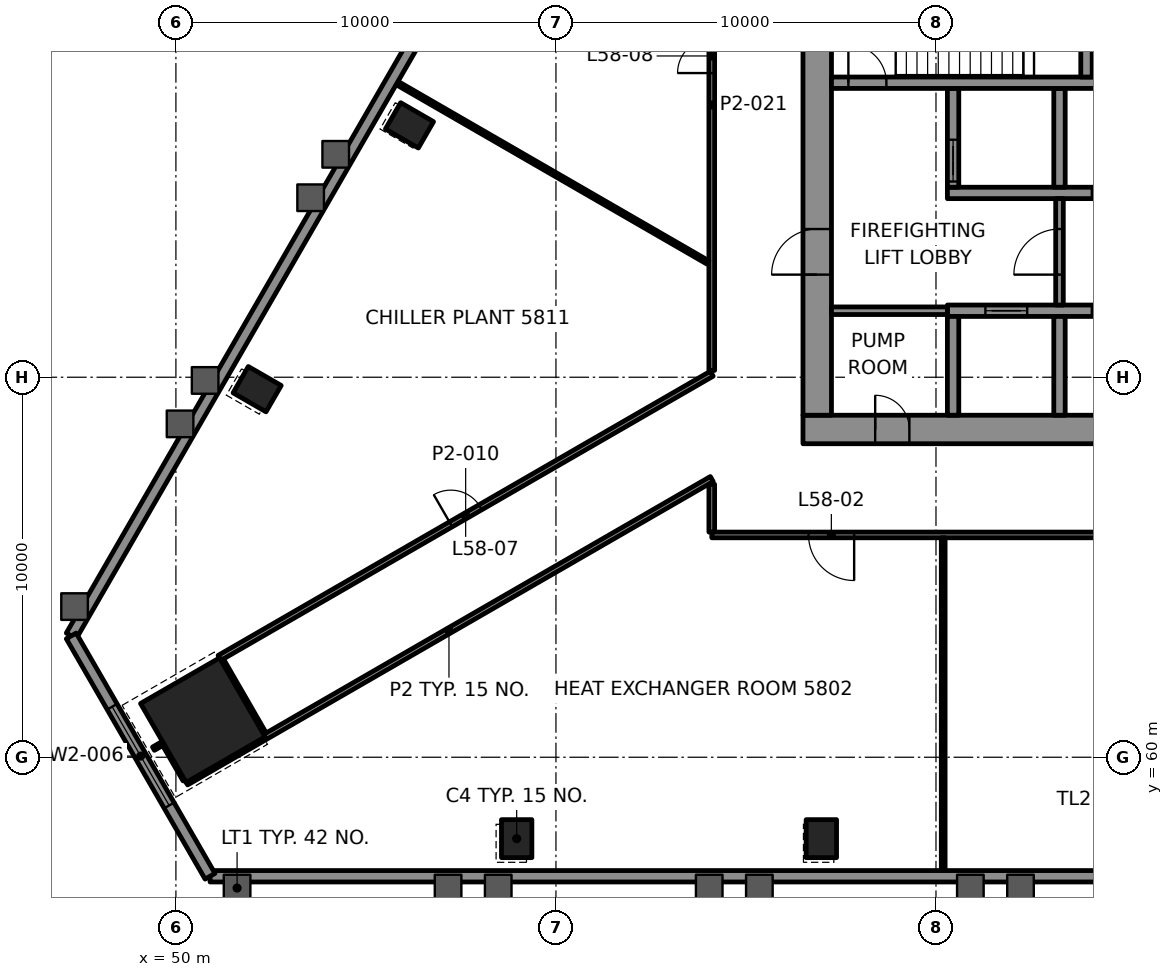
"""IFC4 building model, lengths in metres.
Left out: names, types, materials, properties, quantities, classifications, styles, units other than length and angle.
Written with IfcOpenShell. Run it as: python <this file> out.ifc"""

import sys

from ifc_helpers import new_model, si_unit, direction, frame, frame_2d, origin, origin_2d, place, context, subcontext, project, spatial, rectangle, hollow_rectangle, extrude, element, fill, save


model = new_model("IFC4")
c1 = context("Model", 3, precision=1e-05, world=origin(), true_north=direction((0.0, 1.0)))
c2 = subcontext(c1, "Body", "Model", "MODEL_VIEW")
j1 = project(units=[si_unit("LENGTHUNIT", "METRE"), si_unit("PLANEANGLEUNIT", "RADIAN")], contexts=[c1])
p1 = place(None, origin())
s1 = spatial("IfcSite", under=j1, at=p1, CompositionType="ELEMENT")
p2 = place(p1, origin())
s2 = spatial("IfcBuilding", under=s1, at=p2, CompositionType="ELEMENT")
p3 = place(p2, frame((0.0, 0.0, 247.6)))
s3 = spatial("IfcBuildingStorey", under=s2, at=p3, CompositionType="ELEMENT", Elevation=247.6)
p4 = place(p3, frame((50.709, 60.976, 0.0), z_axis=(0.0, 0.0, 1.0), x_axis=(0.5, -0.866025403784, 0.0)))
e1 = element("IfcColumn", 1, at=p4, inside=s3, PredefinedType="COLUMN", context=c2, shape_type="SweptSolid", body=[
    extrude(rectangle(XDim=2.4, YDim=2.4, at=origin_2d()), origin(), (0.0, 0.0, 1.0), 4.5),
])
for number, where, z_axis, x_axis in (
    (2, (58.967, 57.858, -0.0), (0.0, 0.0, 1.0), (1.0, 0.0, 0.0)),
    (3, (66.983, 57.858, -0.0), (0.0, 0.0, 1.0), (1.0, 0.0, 0.0)),
    (4, (56.146, 76.628, -0.0), (0.0, 0.0, 1.0), (-0.5, -0.866, 0.0)),
    (5, (52.138, 69.686, -0.0), (0.0, 0.0, 1.0), (-0.5, -0.866, 0.0)),
):
    element("IfcColumn", number, at=place(p3, frame(where, z_axis=z_axis, x_axis=x_axis)), inside=s3, PredefinedType="COLUMN", context=c2, shape_type="SweptSolid", body=[
        extrude(hollow_rectangle(XDim=0.8, YDim=1.0, WallThickness=0.05, at=origin_2d()), origin(), (0.0, 0.0, 1.0), 4.5),
    ])
p5 = place(p3, frame((66.5, 68.625, 0.0), z_axis=(0.0, 0.0, 1.0), x_axis=(1.0, 0.0, 0.0)))
e6 = element("IfcWall", 6, at=p5, inside=s3, PredefinedType="SHEAR", context=c2, shape_type="SweptSolid", body=[
    extrude(rectangle(XDim=17.0, YDim=0.75, at=frame_2d((8.5, 0.0))), origin(), (0.0, 0.0, 1.0), 4.05),
])
p6 = place(p5, frame((1.9, 0.0, 0.0)))
e7 = element("IfcOpeningElement", 7, at=p6, cuts=e6, PredefinedType="OPENING", context=c2, shape_type="SweptSolid", body=[
    extrude(rectangle(XDim=0.9, YDim=2.1, at=frame_2d((0.45, 1.05))), frame((0.0, 0.385, 0.0), z_axis=(0.0, -1.0, 0.0), x_axis=(1.0, 0.0, 0.0)), (0.0, 0.0, 1.0), 0.77),
])
p7 = place(p3, frame((66.875, 69.0, 0.0), z_axis=(0.0, 0.0, 1.0), x_axis=(0.0, 1.0, 0.0)))
e8 = element("IfcWall", 8, at=p7, inside=s3, PredefinedType="SHEAR", context=c2, shape_type="SweptSolid", body=[
    extrude(rectangle(XDim=12.0, YDim=0.75, at=frame_2d((6.0, 0.0))), origin(), (0.0, 0.0, 1.0), 4.05),
])
p8 = place(p7, frame((3.7, 0.0, 0.0)))
e9 = element("IfcOpeningElement", 9, at=p8, cuts=e8, PredefinedType="OPENING", context=c2, shape_type="SweptSolid", body=[
    extrude(rectangle(XDim=1.2, YDim=2.1, at=frame_2d((0.6, 1.05))), frame((0.0, 0.385, 0.0), z_axis=(0.0, -1.0, 0.0), x_axis=(1.0, 0.0, 0.0)), (0.0, 0.0, 1.0), 0.77),
])
p9 = place(p3, frame((70.3, 71.75, 0.0), z_axis=(0.0, 0.0, 1.0), x_axis=(1.0, 0.0, 0.0)))
e10 = element("IfcWall", 10, at=p9, inside=s3, PredefinedType="SHEAR", context=c2, shape_type="SweptSolid", body=[
    extrude(rectangle(XDim=11.5, YDim=0.3, at=frame_2d((5.75, 0.0))), origin(), (0.0, 0.0, 1.0), 4.05),
])
p10 = place(p9, frame((1.0, 0.0, 0.0)))
e11 = element("IfcOpeningElement", 11, at=p10, cuts=e10, PredefinedType="OPENING", context=c2, shape_type="SweptSolid", body=[
    extrude(rectangle(XDim=1.1, YDim=2.1, at=frame_2d((0.55, 1.05))), frame((0.0, 0.16, 0.0), z_axis=(0.0, -1.0, 0.0), x_axis=(1.0, 0.0, 0.0)), (0.0, 0.0, 1.0), 0.32),
])
p11 = place(p9, frame((3.8, 0.0, 0.0)))
e12 = element("IfcOpeningElement", 12, at=p11, cuts=e10, PredefinedType="OPENING", context=c2, shape_type="SweptSolid", body=[
    extrude(rectangle(XDim=1.1, YDim=2.1, at=frame_2d((0.55, 1.05))), frame((0.0, 0.16, 0.0), z_axis=(0.0, -1.0, 0.0), x_axis=(1.0, 0.0, 0.0)), (0.0, 0.0, 1.0), 0.32),
])
p12 = place(p9, frame((6.6, 0.0, 0.0)))
e13 = element("IfcOpeningElement", 13, at=p12, cuts=e10, PredefinedType="OPENING", context=c2, shape_type="SweptSolid", body=[
    extrude(rectangle(XDim=1.1, YDim=2.1, at=frame_2d((0.55, 1.05))), frame((0.0, 0.16, 0.0), z_axis=(0.0, -1.0, 0.0), x_axis=(1.0, 0.0, 0.0)), (0.0, 0.0, 1.0), 0.32),
])
p13 = place(p9, frame((9.4, 0.0, 0.0)))
e14 = element("IfcOpeningElement", 14, at=p13, cuts=e10, PredefinedType="OPENING", context=c2, shape_type="SweptSolid", body=[
    extrude(rectangle(XDim=1.1, YDim=2.1, at=frame_2d((0.55, 1.05))), frame((0.0, 0.16, 0.0), z_axis=(0.0, -1.0, 0.0), x_axis=(1.0, 0.0, 0.0)), (0.0, 0.0, 1.0), 0.32),
])
p14 = place(p3, frame((70.3, 74.85, 0.0), z_axis=(0.0, 0.0, 1.0), x_axis=(1.0, 0.0, 0.0)))
e15 = element("IfcWall", 15, at=p14, inside=s3, PredefinedType="SHEAR", context=c2, shape_type="SweptSolid", body=[
    extrude(rectangle(XDim=5.9, YDim=0.3, at=frame_2d((2.95, 0.0))), origin(), (0.0, 0.0, 1.0), 4.05),
])
p15 = place(p14, frame((3.8, 0.0, 0.0)))
e16 = element("IfcOpeningElement", 16, at=p15, cuts=e15, PredefinedType="OPENING", context=c2, shape_type="SweptSolid", body=[
    extrude(rectangle(XDim=1.1, YDim=2.1, at=frame_2d((0.55, 1.05))), frame((0.0, 0.16, 0.0), z_axis=(0.0, -1.0, 0.0), x_axis=(1.0, 0.0, 0.0)), (0.0, 0.0, 1.0), 0.32),
])
p16 = place(p3, frame((70.45, 69.0, 0.0), z_axis=(0.0, 0.0, 1.0), x_axis=(0.0, 1.0, 0.0)))
e17 = element("IfcWall", 17, at=p16, inside=s3, PredefinedType="SHEAR", context=c2, shape_type="SweptSolid", body=[
    extrude(rectangle(XDim=2.6, YDim=0.3, at=frame_2d((1.3, 0.0))), origin(), (0.0, 0.0, 1.0), 4.05),
])
p17 = place(p3, frame((70.45, 75.0, 0.0), z_axis=(0.0, 0.0, 1.0), x_axis=(0.0, 1.0, 0.0)))
e18 = element("IfcWall", 18, at=p17, inside=s3, PredefinedType="SHEAR", context=c2, shape_type="SweptSolid", body=[
    extrude(rectangle(XDim=2.6, YDim=0.3, at=frame_2d((1.3, 0.0))), origin(), (0.0, 0.0, 1.0), 4.05),
])
p18 = place(p17, frame((0.15, 0.0, 0.0)))
e19 = element("IfcOpeningElement", 19, at=p18, cuts=e18, PredefinedType="OPENING", context=c2, shape_type="SweptSolid", body=[
    extrude(rectangle(XDim=1.1, YDim=2.1, at=frame_2d((0.55, 1.05))), frame((0.0, 0.16, 0.0), z_axis=(0.0, -1.0, 0.0), x_axis=(1.0, 0.0, 0.0)), (0.0, 0.0, 1.0), 0.32),
])
for number, where, z_axis, x_axis in (
    (20, (73.25, 69.0, 0.0), (0.0, 0.0, 1.0), (0.0, 1.0, 0.0)),
    (21, (73.25, 75.0, 0.0), (0.0, 0.0, 1.0), (0.0, 1.0, 0.0)),
):
    element("IfcWall", number, at=place(p3, frame(where, z_axis=z_axis, x_axis=x_axis)), inside=s3, PredefinedType="SHEAR", context=c2, shape_type="SweptSolid", body=[
        extrude(rectangle(XDim=2.6, YDim=0.3, at=frame_2d((1.3, 0.0))), origin(), (0.0, 0.0, 1.0), 4.05),
    ])
p19 = place(p3, frame((67.25, 77.75, 0.0), z_axis=(0.0, 0.0, 1.0), x_axis=(1.0, 0.0, 0.0)))
e22 = element("IfcWall", 22, at=p19, inside=s3, PredefinedType="SHEAR", context=c2, shape_type="SweptSolid", body=[
    extrude(rectangle(XDim=15.5, YDim=0.3, at=frame_2d((7.75, 0.0))), origin(), (0.0, 0.0, 1.0), 4.05),
])
p20 = place(p19, frame((0.445, 0.0, 0.0)))
e23 = element("IfcOpeningElement", 23, at=p20, cuts=e22, PredefinedType="OPENING", context=c2, shape_type="SweptSolid", body=[
    extrude(rectangle(XDim=1.0, YDim=2.1, at=frame_2d((0.5, 1.05))), frame((0.0, 0.16, 0.0), z_axis=(0.0, -1.0, 0.0), x_axis=(1.0, 0.0, 0.0)), (0.0, 0.0, 1.0), 0.32),
])
p21 = place(p3, frame((73.96, 77.9, 0.0), z_axis=(0.0, 0.0, 1.0), x_axis=(0.0, 1.0, 0.0)))
e24 = element("IfcWall", 24, at=p21, inside=s3, PredefinedType="SHEAR", context=c2, shape_type="SweptSolid", body=[
    extrude(rectangle(XDim=3.1, YDim=0.3, at=frame_2d((1.55, 0.0))), origin(), (0.0, 0.0, 1.0), 4.05),
])
p22 = place(p3, frame((85.899, 65.85, 0.0), z_axis=(0.0, 0.0, 1.0), x_axis=(-1.0, 0.0, 0.0)))
e25 = element("IfcWall", 25, at=p22, inside=s3, PredefinedType="PARTITIONING", context=c2, shape_type="SweptSolid", body=[
    extrude(rectangle(XDim=21.799, YDim=0.15, at=frame_2d((10.899, 0.0))), origin(), (0.0, 0.0, 1.0), 3.45),
])
p23 = place(p22, frame((7.356, 0.0, 0.0)))
e26 = element("IfcOpeningElement", 26, at=p23, cuts=e25, PredefinedType="OPENING", context=c2, shape_type="SweptSolid", body=[
    extrude(rectangle(XDim=1.2, YDim=2.1, at=frame_2d((0.6, 1.05))), frame((0.0, 0.085, 0.0), z_axis=(0.0, -1.0, 0.0), x_axis=(1.0, 0.0, 0.0)), (0.0, 0.0, 1.0), 0.17),
])
p24 = place(p22, frame((18.053, 0.0, 0.0)))
e27 = element("IfcOpeningElement", 27, at=p24, cuts=e25, PredefinedType="OPENING", context=c2, shape_type="SweptSolid", body=[
    extrude(rectangle(XDim=1.2, YDim=2.1, at=frame_2d((0.6, 1.05))), frame((0.0, 0.085, 0.0), z_axis=(0.0, -1.0, 0.0), x_axis=(1.0, 0.0, 0.0)), (0.0, 0.0, 1.0), 0.17),
])
p25 = place(p3, frame((50.27, 59.337, 0.0), z_axis=(0.0, 0.0, 1.0), x_axis=(0.866026467601, 0.499998157411, 0.0)))
e28 = element("IfcWall", 28, at=p25, inside=s3, PredefinedType="PARTITIONING", context=c2, shape_type="SweptSolid", body=[
    extrude(rectangle(XDim=15.969, YDim=0.15, at=frame_2d((7.985, 0.0))), origin(), (0.0, 0.0, 1.0), 3.297),
])
p26 = place(p3, frame((49.41, 60.226, 0.0), z_axis=(0.0, 0.0, 1.0), x_axis=(0.866006330792, 0.500033033937, 0.0)))
e29 = element("IfcWall", 29, at=p26, inside=s3, PredefinedType="PARTITIONING", context=c2, shape_type="SweptSolid", body=[
    extrude(rectangle(XDim=0.25, YDim=0.1, at=frame_2d((0.125, 0.0))), origin(), (0.0, 0.0, 1.0), 3.45),
])
p27 = place(p3, frame((51.148, 62.615, 0.0), z_axis=(0.0, 0.0, 1.0), x_axis=(0.86602437476, 0.500001782318, 0.0)))
e30 = element("IfcWall", 30, at=p27, inside=s3, PredefinedType="PARTITIONING", context=c2, shape_type="SweptSolid", body=[
    extrude(rectangle(XDim=14.955, YDim=0.15, at=frame_2d((7.478, 0.0))), origin(), (0.0, 0.0, 1.0), 3.45),
])
p28 = place(p27, frame((7.028, 0.0, 0.0)))
e31 = element("IfcOpeningElement", 31, at=p28, cuts=e30, PredefinedType="OPENING", context=c2, shape_type="SweptSolid", body=[
    extrude(rectangle(XDim=0.9, YDim=2.1, at=frame_2d((0.45, 1.05))), frame((0.0, 0.085, 0.0), z_axis=(0.0, -1.0, 0.0), x_axis=(1.0, 0.0, 0.0)), (0.0, 0.0, 1.0), 0.17),
])
p29 = place(p3, frame((70.19, 56.898, 0.0), z_axis=(0.0, 0.0, 1.0), x_axis=(0.0, 1.0, 0.0)))
e32 = element("IfcWall", 32, at=p29, inside=s3, PredefinedType="PARTITIONING", context=c2, shape_type="SweptSolid", body=[
    extrude(rectangle(XDim=8.877, YDim=0.1, at=frame_2d((4.438, 0.0))), origin(), (0.0, 0.0, 1.0), 3.372),
])
p30 = place(p3, frame((64.1, 65.926, 0.0), z_axis=(0.0, 0.0, 1.0), x_axis=(0.0, 1.0, 0.0)))
e33 = element("IfcWall", 33, at=p30, inside=s3, PredefinedType="PARTITIONING", context=c2, shape_type="SweptSolid", body=[
    extrude(rectangle(XDim=1.259, YDim=0.15, at=frame_2d((0.629, 0.0))), origin(), (0.0, 0.0, 1.0), 3.297),
])
p31 = place(p3, frame((64.1, 70.179, 0.0), z_axis=(0.0, 0.0, 1.0), x_axis=(0.0, 1.0, 0.0)))
e34 = element("IfcWall", 34, at=p31, inside=s3, PredefinedType="PARTITIONING", context=c2, shape_type="SweptSolid", body=[
    extrude(rectangle(XDim=13.97, YDim=0.15, at=frame_2d((6.985, 0.0))), origin(), (0.0, 0.0, 1.0), 3.45),
])
p32 = place(p31, frame((7.825, 0.0, 0.0)))
e35 = element("IfcOpeningElement", 35, at=p32, cuts=e34, PredefinedType="OPENING", context=c2, shape_type="SweptSolid", body=[
    extrude(rectangle(XDim=0.9, YDim=2.1, at=frame_2d((0.45, 1.05))), frame((0.0, 0.085, 0.0), z_axis=(0.0, -1.0, 0.0), x_axis=(1.0, 0.0, 0.0)), (0.0, 0.0, 1.0), 0.17),
])
p33 = place(p3, frame((52.31, 60.602, 0.0), z_axis=(0.0, 0.0, 1.0), x_axis=(-0.499957405522, 0.866049994321, 0.0)))
e36 = element("IfcWall", 36, at=p33, inside=s3, PredefinedType="PARTITIONING", context=c2, shape_type="SweptSolid", body=[
    extrude(rectangle(XDim=2.249, YDim=0.15, at=frame_2d((1.125, 0.0))), origin(), (0.0, 0.0, 1.0), 3.297),
])
p34 = place(p3, frame((50.232, 59.402, 0.0), z_axis=(0.0, 0.0, 1.0), x_axis=(-0.500017019935, 0.866015577098, 0.0)))
e37 = element("IfcWall", 37, at=p34, inside=s3, PredefinedType="PARTITIONING", context=c2, shape_type="SweptSolid", body=[
    extrude(rectangle(XDim=1.124, YDim=0.1, at=frame_2d((0.562, 0.0))), origin(), (0.0, 0.0, 1.0), 3.45),
])
p35 = place(p3, frame((63.999, 73.02, 0.0), z_axis=(0.0, 0.0, 1.0), x_axis=(-0.866024489559, 0.500001583482, 0.0)))
e38 = element("IfcWall", 38, at=p35, inside=s3, PredefinedType="PARTITIONING", context=c2, shape_type="SweptSolid", body=[
    extrude(rectangle(XDim=9.565, YDim=0.1, at=frame_2d((4.782, 0.0))), origin(), (0.0, 0.0, 1.0), 3.372),
])
for number, where, z_axis, x_axis in (
    (39, (50.898, 56.868, 0.0), (0.0, 0.0, 1.0), (1.0, 0.0, 0.0)),
    (40, (71.348, 104.939, 0.0), (0.0, 0.0, 1.0), (-0.5, -0.866, 0.0)),
):
    element("IfcWall", number, at=place(p3, frame(where, z_axis=z_axis, x_axis=x_axis)), inside=s3, PredefinedType="SOLIDWALL", context=c2, shape_type="SweptSolid", body=[
        extrude(rectangle(XDim=48.204, YDim=0.3, at=frame_2d((24.102, 0.0))), origin(), (0.0, 0.0, 1.0), 4.05),
    ])
p36 = place(p3, frame((47.246, 63.193, 0.0), z_axis=(0.0, 0.0, 1.0), x_axis=(0.500000231294, -0.866025270247, 0.0)))
e41 = element("IfcWall", 41, at=p36, inside=s3, PredefinedType="SOLIDWALL", context=c2, shape_type="SweptSolid", body=[
    extrude(rectangle(XDim=7.304, YDim=0.3, at=frame_2d((3.652, 0.0))), origin(), (0.0, 0.0, 1.0), 4.05),
])
p37 = place(p36, frame((2.152, 0.0, 0.8)))
e42 = element("IfcOpeningElement", 42, at=p37, cuts=e41, PredefinedType="OPENING", context=c2, shape_type="SweptSolid", body=[
    extrude(rectangle(XDim=3.0, YDim=2.4, at=frame_2d((1.5, 1.2))), frame((0.0, 0.16, 0.0), z_axis=(0.0, -1.0, 0.0), x_axis=(1.0, 0.0, 0.0)), (0.0, 0.0, 1.0), 0.32),
])
p38 = place(p3, frame((67.25, 71.75, 0.0), z_axis=(0.0, 0.0, 1.0), x_axis=(1.0, 0.0, 0.0)))
e43 = element("IfcWall", 43, at=p38, inside=s3, PredefinedType="PARTITIONING", context=c2, shape_type="SweptSolid", body=[
    extrude(rectangle(XDim=3.05, YDim=0.2, at=frame_2d((1.525, 0.0))), origin(), (0.0, 0.0, 1.0), 4.05),
])
p39 = place(p3, frame((73.25, 71.9, 0.0), z_axis=(0.0, 0.0, 1.0), x_axis=(0.0, 1.0, 0.0)))
e44 = element("IfcWall", 44, at=p39, inside=s3, PredefinedType="PARTITIONING", context=c2, shape_type="SweptSolid", body=[
    extrude(rectangle(XDim=2.8, YDim=0.2, at=frame_2d((1.4, 0.0))), origin(), (0.0, 0.0, 1.0), 4.05),
])
p40 = place(p39, frame((0.8, 0.0, 0.0)))
e45 = element("IfcOpeningElement", 45, at=p40, cuts=e44, PredefinedType="OPENING", context=c2, shape_type="SweptSolid", body=[
    extrude(rectangle(XDim=1.2, YDim=2.1, at=frame_2d((0.6, 1.05))), frame((0.0, 0.11, 0.0), z_axis=(0.0, -1.0, 0.0), x_axis=(1.0, 0.0, 0.0)), (0.0, 0.0, 1.0), 0.22),
])
p41 = place(p24, origin())
e46 = element("IfcDoor", 46, at=p41, inside=s3, OperationType="DOUBLE_DOOR_SINGLE_SWING", PredefinedType="DOOR", context=c2, shape_type="SweptSolid", body=[
    extrude(rectangle(XDim=1.2, YDim=2.1, at=frame_2d((0.6, 1.05))), frame((0.0, 0.025, 0.0), z_axis=(0.0, -1.0, 0.0), x_axis=(1.0, 0.0, 0.0)), (0.0, 0.0, 1.0), 0.05),
])
fill(e27, e46)
p42 = place(p28, origin())
e47 = element("IfcDoor", 47, at=p42, inside=s3, OperationType="SINGLE_SWING_RIGHT", PredefinedType="DOOR", context=c2, shape_type="SweptSolid", body=[
    extrude(rectangle(XDim=0.9, YDim=2.1, at=frame_2d((0.45, 1.05))), frame((0.0, 0.025, 0.0), z_axis=(0.0, -1.0, 0.0), x_axis=(1.0, 0.0, 0.0)), (0.0, 0.0, 1.0), 0.05),
])
fill(e31, e47)
p43 = place(p32, origin())
e48 = element("IfcDoor", 48, at=p43, inside=s3, OperationType="SINGLE_SWING_LEFT", PredefinedType="DOOR", context=c2, shape_type="SweptSolid", body=[
    extrude(rectangle(XDim=0.9, YDim=2.1, at=frame_2d((0.45, 1.05))), frame((0.0, 0.025, 0.0), z_axis=(0.0, -1.0, 0.0), x_axis=(1.0, 0.0, 0.0)), (0.0, 0.0, 1.0), 0.05),
])
fill(e35, e48)
p44 = place(p37, origin())
e49 = element("IfcWindow", 49, at=p44, inside=s3, PartitioningType="SINGLE_PANEL", PredefinedType="WINDOW", context=c2, shape_type="SweptSolid", body=[
    extrude(rectangle(XDim=3.0, YDim=2.4, at=frame_2d((1.5, 1.2))), frame((0.0, 0.03, 0.0), z_axis=(0.0, -1.0, 0.0), x_axis=(1.0, 0.0, 0.0)), (0.0, 0.0, 1.0), 0.06),
])
fill(e42, e49)
p45 = place(p10, origin())
e50 = element("IfcDoor", 50, at=p45, inside=s3, OperationType="DOUBLE_DOOR_SLIDING", PredefinedType="DOOR", context=c2, shape_type="SweptSolid", body=[
    extrude(rectangle(XDim=1.1, YDim=2.1, at=frame_2d((0.55, 1.05))), frame((0.0, 0.025, 0.0), z_axis=(0.0, -1.0, 0.0), x_axis=(1.0, 0.0, 0.0)), (0.0, 0.0, 1.0), 0.05),
])
fill(e11, e50)
p46 = place(p11, origin())
e51 = element("IfcDoor", 51, at=p46, inside=s3, OperationType="DOUBLE_DOOR_SLIDING", PredefinedType="DOOR", context=c2, shape_type="SweptSolid", body=[
    extrude(rectangle(XDim=1.1, YDim=2.1, at=frame_2d((0.55, 1.05))), frame((0.0, 0.025, 0.0), z_axis=(0.0, -1.0, 0.0), x_axis=(1.0, 0.0, 0.0)), (0.0, 0.0, 1.0), 0.05),
])
fill(e12, e51)
p47 = place(p18, origin())
e52 = element("IfcDoor", 52, at=p47, inside=s3, OperationType="DOUBLE_DOOR_SLIDING", PredefinedType="DOOR", context=c2, shape_type="SweptSolid", body=[
    extrude(rectangle(XDim=1.1, YDim=2.1, at=frame_2d((0.55, 1.05))), frame((0.0, 0.025, 0.0), z_axis=(0.0, -1.0, 0.0), x_axis=(1.0, 0.0, 0.0)), (0.0, 0.0, 1.0), 0.05),
])
fill(e19, e52)
p48 = place(p15, origin())
e53 = element("IfcDoor", 53, at=p48, inside=s3, OperationType="DOUBLE_DOOR_SLIDING", PredefinedType="DOOR", context=c2, shape_type="SweptSolid", body=[
    extrude(rectangle(XDim=1.1, YDim=2.1, at=frame_2d((0.55, 1.05))), frame((0.0, 0.025, 0.0), z_axis=(0.0, -1.0, 0.0), x_axis=(1.0, 0.0, 0.0)), (0.0, 0.0, 1.0), 0.05),
])
fill(e16, e53)
p49 = place(p20, origin())
e54 = element("IfcDoor", 54, at=p49, inside=s3, OperationType="SINGLE_SWING_LEFT", PredefinedType="DOOR", context=c2, shape_type="SweptSolid", body=[
    extrude(rectangle(XDim=1.0, YDim=2.1, at=frame_2d((0.5, 1.05))), frame((0.0, 0.025, 0.0), z_axis=(0.0, -1.0, 0.0), x_axis=(1.0, 0.0, 0.0)), (0.0, 0.0, 1.0), 0.05),
])
fill(e23, e54)
p50 = place(p40, origin())
e55 = element("IfcDoor", 55, at=p50, inside=s3, OperationType="SINGLE_SWING_LEFT", PredefinedType="DOOR", context=c2, shape_type="SweptSolid", body=[
    extrude(rectangle(XDim=1.2, YDim=2.1, at=frame_2d((0.6, 1.05))), frame((0.0, 0.025, 0.0), z_axis=(0.0, -1.0, 0.0), x_axis=(1.0, 0.0, 0.0)), (0.0, 0.0, 1.0), 0.05),
])
fill(e45, e55)
p51 = place(p8, origin())
e56 = element("IfcDoor", 56, at=p51, inside=s3, OperationType="SINGLE_SWING_RIGHT", PredefinedType="DOOR", context=c2, shape_type="SweptSolid", body=[
    extrude(rectangle(XDim=1.2, YDim=2.1, at=frame_2d((0.6, 1.05))), frame((0.0, 0.095, 0.0), z_axis=(0.0, -1.0, 0.0), x_axis=(1.0, 0.0, 0.0)), (0.0, 0.0, 1.0), 0.19),
])
fill(e9, e56)
p52 = place(p6, origin())
e57 = element("IfcDoor", 57, at=p52, inside=s3, OperationType="SINGLE_SWING_RIGHT", PredefinedType="DOOR", context=c2, shape_type="SweptSolid", body=[
    extrude(rectangle(XDim=0.9, YDim=2.1, at=frame_2d((0.45, 1.05))), frame((0.0, 0.095, 0.0), z_axis=(0.0, -1.0, 0.0), x_axis=(1.0, 0.0, 0.0)), (0.0, 0.0, 1.0), 0.19),
])
fill(e7, e57)
save(model, sys.argv[1])
